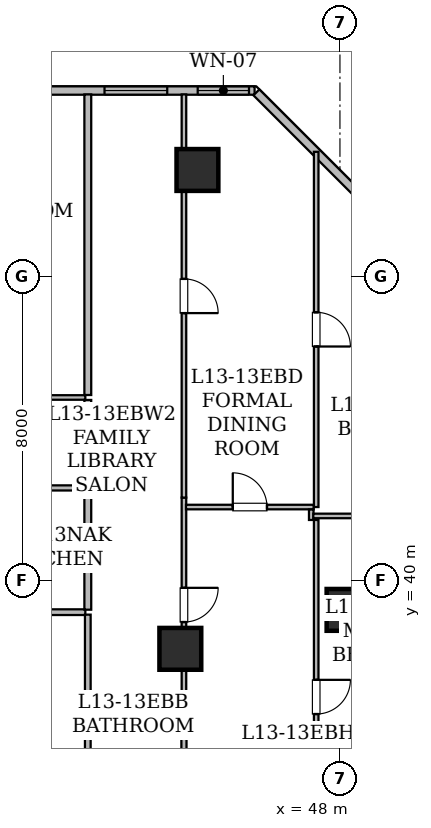
"""IFC4 building model, lengths in metres.
Left out: names, types, materials, properties, quantities, classifications, styles, units other than length and angle.
Written with IfcOpenShell. Run it as: python <this file> out.ifc"""

import sys

from ifc_helpers import new_model, si_unit, direction, frame, frame_2d, origin, origin_2d, place, context, subcontext, project, spatial, rectangle, hollow_rectangle, extrude, element, fill, save


model = new_model("IFC4")
c1 = context("Model", 3, precision=1e-05, world=origin(), true_north=direction((0.0, 1.0)))
c2 = subcontext(c1, "Body", "Model", "MODEL_VIEW")
j1 = project(units=[si_unit("LENGTHUNIT", "METRE"), si_unit("PLANEANGLEUNIT", "RADIAN")], contexts=[c1])
p1 = place(None, origin())
s1 = spatial("IfcSite", under=j1, at=p1, CompositionType="ELEMENT")
p2 = place(p1, origin())
s2 = spatial("IfcBuilding", under=s1, at=p2, CompositionType="ELEMENT")
p3 = place(p2, frame((0.0, 0.0, 55.2)))
s3 = spatial("IfcBuildingStorey", under=s2, at=p3, CompositionType="ELEMENT", Elevation=55.2)
for number, where, z_axis, x_axis in (
    (1, (44.25, 50.8, 0.0), (0.0, 0.0, 1.0), (1.0, 0.0, 0.0)),
    (2, (48.2, 39.225, 0.0), (0.0, 0.0, 1.0), (1.0, 0.0, 0.0)),
    (3, (43.8, 38.2, 0.0), (0.0, 0.0, 1.0), (1.0, 0.0, 0.0)),
):
    element("IfcColumn", number, at=place(p3, frame(where, z_axis=z_axis, x_axis=x_axis)), inside=s3, PredefinedType="COLUMN", context=c2, shape_type="SweptSolid", body=[
        extrude(hollow_rectangle(XDim=1.1, YDim=1.1, WallThickness=0.055, at=origin_2d()), origin(), (0.0, 0.0, 1.0), 3.65),
    ])
p4 = place(p3, frame((8.315, 52.89, 0.0), z_axis=(0.0, 0.0, 1.0), x_axis=(1.0, 0.0, 0.0)))
e4 = element("IfcWall", 4, at=p4, inside=s3, PredefinedType="STANDARD", context=c2, shape_type="SweptSolid", body=[
    extrude(rectangle(XDim=37.439, YDim=0.22, at=frame_2d((18.719, 0.0))), origin(), (0.0, 0.0, 1.0), 3.43),
])
p5 = place(p4, frame((5.093, 0.0, 0.85)))
e5 = element("IfcOpeningElement", 5, at=p5, cuts=e4, PredefinedType="OPENING", context=c2, shape_type="SweptSolid", body=[
    extrude(rectangle(XDim=1.65, YDim=1.55, at=frame_2d((0.825, 0.775))), frame((0.0, 0.12, 0.0), z_axis=(0.0, -1.0, 0.0), x_axis=(1.0, 0.0, 0.0)), (0.0, 0.0, 1.0), 0.24),
])
p6 = place(p4, frame((13.055, 0.0, 0.8)))
e6 = element("IfcOpeningElement", 6, at=p6, cuts=e4, PredefinedType="OPENING", context=c2, shape_type="SweptSolid", body=[
    extrude(rectangle(XDim=1.2, YDim=1.5, at=frame_2d((0.6, 0.75))), frame((0.0, 0.12, 0.0), z_axis=(0.0, -1.0, 0.0), x_axis=(1.0, 0.0, 0.0)), (0.0, 0.0, 1.0), 0.24),
])
p7 = place(p4, frame((10.005, 0.0, 0.85)))
e7 = element("IfcOpeningElement", 7, at=p7, cuts=e4, PredefinedType="OPENING", context=c2, shape_type="SweptSolid", body=[
    extrude(rectangle(XDim=1.65, YDim=1.55, at=frame_2d((0.825, 0.775))), frame((0.0, 0.12, 0.0), z_axis=(0.0, -1.0, 0.0), x_axis=(1.0, 0.0, 0.0)), (0.0, 0.0, 1.0), 0.24),
])
p8 = place(p4, frame((15.655, 0.0, 0.85)))
e8 = element("IfcOpeningElement", 8, at=p8, cuts=e4, PredefinedType="OPENING", context=c2, shape_type="SweptSolid", body=[
    extrude(rectangle(XDim=1.65, YDim=1.55, at=frame_2d((0.825, 0.775))), frame((0.0, 0.12, 0.0), z_axis=(0.0, -1.0, 0.0), x_axis=(1.0, 0.0, 0.0)), (0.0, 0.0, 1.0), 0.24),
])
p9 = place(p4, frame((25.185, 0.0, 0.8)))
e9 = element("IfcOpeningElement", 9, at=p9, cuts=e4, PredefinedType="OPENING", context=c2, shape_type="SweptSolid", body=[
    extrude(rectangle(XDim=1.2, YDim=1.5, at=frame_2d((0.6, 0.75))), frame((0.0, 0.12, 0.0), z_axis=(0.0, -1.0, 0.0), x_axis=(1.0, 0.0, 0.0)), (0.0, 0.0, 1.0), 0.24),
])
p10 = place(p4, frame((20.935, 0.0, 0.85)))
e10 = element("IfcOpeningElement", 10, at=p10, cuts=e4, PredefinedType="OPENING", context=c2, shape_type="SweptSolid", body=[
    extrude(rectangle(XDim=1.65, YDim=1.55, at=frame_2d((0.825, 0.775))), frame((0.0, 0.12, 0.0), z_axis=(0.0, -1.0, 0.0), x_axis=(1.0, 0.0, 0.0)), (0.0, 0.0, 1.0), 0.24),
])
p11 = place(p4, frame((28.985, 0.0, 0.85)))
e11 = element("IfcOpeningElement", 11, at=p11, cuts=e4, PredefinedType="OPENING", context=c2, shape_type="SweptSolid", body=[
    extrude(rectangle(XDim=1.65, YDim=1.55, at=frame_2d((0.825, 0.775))), frame((0.0, 0.12, 0.0), z_axis=(0.0, -1.0, 0.0), x_axis=(1.0, 0.0, 0.0)), (0.0, 0.0, 1.0), 0.24),
])
p12 = place(p4, frame((33.49, 0.0, 0.85)))
e12 = element("IfcOpeningElement", 12, at=p12, cuts=e4, PredefinedType="OPENING", context=c2, shape_type="SweptSolid", body=[
    extrude(rectangle(XDim=1.65, YDim=1.55, at=frame_2d((0.825, 0.775))), frame((0.0, 0.12, 0.0), z_axis=(0.0, -1.0, 0.0), x_axis=(1.0, 0.0, 0.0)), (0.0, 0.0, 1.0), 0.24),
])
p13 = place(p4, frame((35.942, 0.0, 0.85)))
e13 = element("IfcOpeningElement", 13, at=p13, cuts=e4, PredefinedType="OPENING", context=c2, shape_type="SweptSolid", body=[
    extrude(rectangle(XDim=1.35, YDim=1.5, at=frame_2d((0.675, 0.75))), frame((0.0, 0.12, 0.0), z_axis=(0.0, -1.0, 0.0), x_axis=(1.0, 0.0, 0.0)), (0.0, 0.0, 1.0), 0.24),
])
p14 = place(p3, frame((45.802, 52.842, 0.0), z_axis=(0.0, 0.0, 1.0), x_axis=(0.707085666273, -0.70712789547, 0.0)))
e14 = element("IfcWall", 14, at=p14, inside=s3, PredefinedType="STANDARD", context=c2, shape_type="SweptSolid", body=[
    extrude(rectangle(XDim=5.781, YDim=0.22, at=frame_2d((2.891, 0.0))), origin(), (0.0, 0.0, 1.0), 3.43),
])
p15 = place(p3, frame((34.299, 39.165, 0.0), z_axis=(0.0, 0.0, 1.0), x_axis=(1.0, 0.0, 0.0)))
e15 = element("IfcWall", 15, at=p15, inside=s3, PredefinedType="STANDARD", context=c2, shape_type="SweptSolid", body=[
    extrude(rectangle(XDim=7.001, YDim=0.15, at=frame_2d((3.5, 0.0))), origin(), (0.0, 0.0, 1.0), 3.43),
])
p16 = place(p3, frame((41.365, 39.1, 0.0), z_axis=(0.0, 0.0, 1.0), x_axis=(0.0, -1.0, 0.0)))
e16 = element("IfcWall", 16, at=p16, inside=s3, PredefinedType="STANDARD", context=c2, shape_type="SweptSolid", body=[
    extrude(rectangle(XDim=2.843, YDim=0.15, at=frame_2d((1.421, 0.0))), origin(), (0.0, 0.0, 1.0), 2.647),
])
p17 = place(p3, frame((41.365, 36.257, 0.0), z_axis=(0.0, 0.0, 1.0), x_axis=(0.0, -1.0, 0.0)))
e17 = element("IfcWall", 17, at=p17, inside=s3, PredefinedType="STANDARD", context=c2, shape_type="SweptSolid", body=[
    extrude(rectangle(XDim=4.467, YDim=0.15, at=frame_2d((2.233, 0.0))), origin(), (0.0, 0.0, 1.0), 3.43),
])
p18 = place(p3, frame((41.3, 42.434, 0.0), z_axis=(0.0, 0.0, 1.0), x_axis=(-1.0, 0.0, 0.0)))
e18 = element("IfcWall", 18, at=p18, inside=s3, PredefinedType="PARTITIONING", context=c2, shape_type="SweptSolid", body=[
    extrude(rectangle(XDim=7.315, YDim=0.135, at=frame_2d((3.657, 0.0))), origin(), (0.0, 0.0, 1.0), 2.957),
])
p19 = place(p18, frame((3.233, 0.0, 0.0)))
e19 = element("IfcOpeningElement", 19, at=p19, cuts=e18, PredefinedType="OPENING", context=c2, shape_type="SweptSolid", body=[
    extrude(rectangle(XDim=0.85, YDim=2.1, at=frame_2d((0.425, 1.05))), frame((0.0, 0.077, 0.0), z_axis=(0.0, -1.0, 0.0), x_axis=(1.0, 0.0, 0.0)), (0.0, 0.0, 1.0), 0.155),
])
p20 = place(p3, frame((34.82, 44.814, 0.0), z_axis=(0.0, 0.0, 1.0), x_axis=(1.0, 0.0, 0.0)))
e20 = element("IfcWall", 20, at=p20, inside=s3, PredefinedType="PARTITIONING", context=c2, shape_type="SweptSolid", body=[
    extrude(rectangle(XDim=6.48, YDim=0.12, at=frame_2d((3.24, 0.0))), origin(), (0.0, 0.0, 1.0), 3.43),
])
p21 = place(p3, frame((41.365, 44.749, 0.0), z_axis=(0.0, 0.0, 1.0), x_axis=(0.0, -1.0, 0.0)))
e21 = element("IfcWall", 21, at=p21, inside=s3, PredefinedType="STANDARD", context=c2, shape_type="SweptSolid", body=[
    extrude(rectangle(XDim=2.25, YDim=0.18, at=frame_2d((1.125, 0.0))), origin(), (0.0, 0.0, 1.0), 2.957),
])
p22 = place(p3, frame((41.365, 42.369, 0.0), z_axis=(0.0, 0.0, 1.0), x_axis=(0.0, -1.0, 0.0)))
e22 = element("IfcWall", 22, at=p22, inside=s3, PredefinedType="STANDARD", context=c2, shape_type="SweptSolid", body=[
    extrude(rectangle(XDim=3.139, YDim=0.18, at=frame_2d((1.569, 0.0))), origin(), (0.0, 0.0, 1.0), 3.43),
])
p23 = place(p3, frame((41.365, 52.788, 0.0), z_axis=(0.0, 0.0, 1.0), x_axis=(0.0, -1.0, 0.0)))
e23 = element("IfcWall", 23, at=p23, inside=s3, PredefinedType="STANDARD", context=c2, shape_type="SweptSolid", body=[
    extrude(rectangle(XDim=7.909, YDim=0.18, at=frame_2d((3.955, 0.0))), origin(), (0.0, 0.0, 1.0), 2.803),
])
p24 = place(p3, frame((43.895, 42.18, 0.0), z_axis=(0.0, 0.0, 1.0), x_axis=(0.0, -1.0, 0.0)))
e24 = element("IfcWall", 24, at=p24, inside=s3, PredefinedType="PARTITIONING", context=c2, shape_type="SweptSolid", body=[
    extrude(rectangle(XDim=5.609, YDim=0.12, at=frame_2d((2.804, 0.0))), origin(), (0.0, 0.0, 1.0), 2.647),
])
p25 = place(p24, frame((2.375, 0.0, 0.0)))
e25 = element("IfcOpeningElement", 25, at=p25, cuts=e24, PredefinedType="OPENING", context=c2, shape_type="SweptSolid", body=[
    extrude(rectangle(XDim=0.9, YDim=2.1, at=frame_2d((0.45, 1.05))), frame((0.0, 0.07, 0.0), z_axis=(0.0, -1.0, 0.0), x_axis=(1.0, 0.0, 0.0)), (0.0, 0.0, 1.0), 0.14),
])
p26 = place(p3, frame((43.895, 52.788, 0.0), z_axis=(0.0, 0.0, 1.0), x_axis=(0.0, -1.0, 0.0)))
e26 = element("IfcWall", 26, at=p26, inside=s3, PredefinedType="PARTITIONING", context=c2, shape_type="SweptSolid", body=[
    extrude(rectangle(XDim=10.608, YDim=0.12, at=frame_2d((5.304, 0.0))), origin(), (0.0, 0.0, 1.0), 2.647),
])
p27 = place(p26, frame((4.854, 0.0, 0.0)))
e27 = element("IfcOpeningElement", 27, at=p27, cuts=e26, PredefinedType="OPENING", context=c2, shape_type="SweptSolid", body=[
    extrude(rectangle(XDim=0.9, YDim=2.1, at=frame_2d((0.45, 1.05))), frame((0.0, 0.07, 0.0), z_axis=(0.0, -1.0, 0.0), x_axis=(1.0, 0.0, 0.0)), (0.0, 0.0, 1.0), 0.14),
])
p28 = place(p3, frame((43.83, 36.506, 0.0), z_axis=(0.0, 0.0, 1.0), x_axis=(-1.0, 0.0, 0.0)))
e28 = element("IfcWall", 28, at=p28, inside=s3, PredefinedType="PARTITIONING", context=c2, shape_type="SweptSolid", body=[
    extrude(rectangle(XDim=2.398, YDim=0.135, at=frame_2d((1.199, 0.0))), origin(), (0.0, 0.0, 1.0), 2.647),
])
p29 = place(p3, frame((43.949, 41.931, 0.0), z_axis=(0.0, 0.0, 1.0), x_axis=(1.0, 0.0, 0.0)))
e29 = element("IfcWall", 29, at=p29, inside=s3, PredefinedType="PARTITIONING", context=c2, shape_type="SweptSolid", body=[
    extrude(rectangle(XDim=3.361, YDim=0.12, at=frame_2d((1.681, 0.0))), origin(), (0.0, 0.0, 1.0), 2.647),
])
p30 = place(p29, frame((1.231, 0.0, 0.0)))
e30 = element("IfcOpeningElement", 30, at=p30, cuts=e29, PredefinedType="OPENING", context=c2, shape_type="SweptSolid", body=[
    extrude(rectangle(XDim=0.9, YDim=2.1, at=frame_2d((0.45, 1.05))), frame((0.0, 0.07, 0.0), z_axis=(0.0, -1.0, 0.0), x_axis=(1.0, 0.0, 0.0)), (0.0, 0.0, 1.0), 0.14),
])
p31 = place(p3, frame((47.245, 41.866, 0.0), z_axis=(0.0, 0.0, 1.0), x_axis=(0.0, -1.0, 0.0)))
e31 = element("IfcWall", 31, at=p31, inside=s3, PredefinedType="PARTITIONING", context=c2, shape_type="SweptSolid", body=[
    extrude(rectangle(XDim=0.275, YDim=0.12, at=frame_2d((0.137, 0.0))), origin(), (0.0, 0.0, 1.0), 2.803),
])
p32 = place(p3, frame((43.895, 31.476, 0.0), z_axis=(0.0, 0.0, 1.0), x_axis=(0.0, 1.0, 0.0)))
e32 = element("IfcWall", 32, at=p32, inside=s3, PredefinedType="PARTITIONING", context=c2, shape_type="SweptSolid", body=[
    extrude(rectangle(XDim=5.095, YDim=0.135, at=frame_2d((2.547, 0.0))), origin(), (0.0, 0.0, 1.0), 2.647),
])
p33 = place(p32, frame((2.123, 0.0, 0.0)))
e33 = element("IfcOpeningElement", 33, at=p33, cuts=e32, PredefinedType="OPENING", context=c2, shape_type="SweptSolid", body=[
    extrude(rectangle(XDim=0.85, YDim=2.1, at=frame_2d((0.425, 1.05))), frame((0.0, 0.077, 0.0), z_axis=(0.0, -1.0, 0.0), x_axis=(1.0, 0.0, 0.0)), (0.0, 0.0, 1.0), 0.155),
])
p34 = place(p3, frame((47.375, 41.591, 0.0), z_axis=(0.0, 0.0, 1.0), x_axis=(0.0, -1.0, 0.0)))
e34 = element("IfcWall", 34, at=p34, inside=s3, PredefinedType="PARTITIONING", context=c2, shape_type="SweptSolid", body=[
    extrude(rectangle(XDim=9.315, YDim=0.12, at=frame_2d((4.658, 0.0))), origin(), (0.0, 0.0, 1.0), 2.647),
])
p35 = place(p34, frame((4.207, 0.0, 0.0)))
e35 = element("IfcOpeningElement", 35, at=p35, cuts=e34, PredefinedType="OPENING", context=c2, shape_type="SweptSolid", body=[
    extrude(rectangle(XDim=0.9, YDim=2.1, at=frame_2d((0.45, 1.05))), frame((0.0, 0.07, 0.0), z_axis=(0.0, -1.0, 0.0), x_axis=(1.0, 0.0, 0.0)), (0.0, 0.0, 1.0), 0.14),
])
p36 = place(p3, frame((47.375, 51.278, 0.0), z_axis=(0.0, 0.0, 1.0), x_axis=(0.0, -1.0, 0.0)))
e36 = element("IfcWall", 36, at=p36, inside=s3, PredefinedType="PARTITIONING", context=c2, shape_type="SweptSolid", body=[
    extrude(rectangle(XDim=9.347, YDim=0.12, at=frame_2d((4.674, 0.0))), origin(), (0.0, 0.0, 1.0), 2.803),
])
p37 = place(p36, frame((4.223, 0.0, 0.0)))
e37 = element("IfcOpeningElement", 37, at=p37, cuts=e36, PredefinedType="OPENING", context=c2, shape_type="SweptSolid", body=[
    extrude(rectangle(XDim=0.9, YDim=2.1, at=frame_2d((0.45, 1.05))), frame((0.0, 0.07, 0.0), z_axis=(0.0, -1.0, 0.0), x_axis=(1.0, 0.0, 0.0)), (0.0, 0.0, 1.0), 0.14),
])
p38 = place(p3, frame((47.299, 41.697, 0.0), z_axis=(0.0, 0.0, 1.0), x_axis=(1.0, 0.0, 0.0)))
e38 = element("IfcWall", 38, at=p38, inside=s3, PredefinedType="PARTITIONING", context=c2, shape_type="SweptSolid", body=[
    extrude(rectangle(XDim=2.489, YDim=0.12, at=frame_2d((1.245, 0.0))), origin(), (0.0, 0.0, 1.0), 2.803),
])
p39 = place(p12, origin())
e39 = element("IfcWindow", 39, at=p39, inside=s3, PartitioningType="SINGLE_PANEL", PredefinedType="WINDOW", context=c2, shape_type="SweptSolid", body=[
    extrude(rectangle(XDim=1.65, YDim=1.55, at=frame_2d((0.825, 0.775))), frame((0.0, 0.03, 0.0), z_axis=(0.0, -1.0, 0.0), x_axis=(1.0, 0.0, 0.0)), (0.0, 0.0, 1.0), 0.06),
])
fill(e12, e39)
p40 = place(p13, origin())
e40 = element("IfcWindow", 40, at=p40, inside=s3, PartitioningType="SINGLE_PANEL", PredefinedType="WINDOW", context=c2, shape_type="SweptSolid", body=[
    extrude(rectangle(XDim=1.35, YDim=1.5, at=frame_2d((0.675, 0.75))), frame((0.0, 0.03, 0.0), z_axis=(0.0, -1.0, 0.0), x_axis=(1.0, 0.0, 0.0)), (0.0, 0.0, 1.0), 0.06),
])
fill(e13, e40)
p41 = place(p25, origin())
e41 = element("IfcDoor", 41, at=p41, inside=s3, OperationType="SINGLE_SWING_LEFT", PredefinedType="DOOR", context=c2, shape_type="SweptSolid", body=[
    extrude(rectangle(XDim=0.9, YDim=2.1, at=frame_2d((0.45, 1.05))), frame((0.0, 0.025, 0.0), z_axis=(0.0, -1.0, 0.0), x_axis=(1.0, 0.0, 0.0)), (0.0, 0.0, 1.0), 0.05),
])
fill(e25, e41)
p42 = place(p27, origin())
e42 = element("IfcDoor", 42, at=p42, inside=s3, OperationType="SINGLE_SWING_RIGHT", PredefinedType="DOOR", context=c2, shape_type="SweptSolid", body=[
    extrude(rectangle(XDim=0.9, YDim=2.1, at=frame_2d((0.45, 1.05))), frame((0.0, 0.025, 0.0), z_axis=(0.0, -1.0, 0.0), x_axis=(1.0, 0.0, 0.0)), (0.0, 0.0, 1.0), 0.05),
])
fill(e27, e42)
p43 = place(p30, origin())
e43 = element("IfcDoor", 43, at=p43, inside=s3, OperationType="SINGLE_SWING_LEFT", PredefinedType="DOOR", context=c2, shape_type="SweptSolid", body=[
    extrude(rectangle(XDim=0.9, YDim=2.1, at=frame_2d((0.45, 1.05))), frame((0.0, 0.025, 0.0), z_axis=(0.0, -1.0, 0.0), x_axis=(1.0, 0.0, 0.0)), (0.0, 0.0, 1.0), 0.05),
])
fill(e30, e43)
p44 = place(p35, origin())
e44 = element("IfcDoor", 44, at=p44, inside=s3, OperationType="SINGLE_SWING_LEFT", PredefinedType="DOOR", context=c2, shape_type="SweptSolid", body=[
    extrude(rectangle(XDim=0.9, YDim=2.1, at=frame_2d((0.45, 1.05))), frame((0.0, 0.025, 0.0), z_axis=(0.0, -1.0, 0.0), x_axis=(1.0, 0.0, 0.0)), (0.0, 0.0, 1.0), 0.05),
])
fill(e35, e44)
p45 = place(p37, origin())
e45 = element("IfcDoor", 45, at=p45, inside=s3, OperationType="SINGLE_SWING_RIGHT", PredefinedType="DOOR", context=c2, shape_type="SweptSolid", body=[
    extrude(rectangle(XDim=0.9, YDim=2.1, at=frame_2d((0.45, 1.05))), frame((0.0, 0.025, 0.0), z_axis=(0.0, -1.0, 0.0), x_axis=(1.0, 0.0, 0.0)), (0.0, 0.0, 1.0), 0.05),
])
fill(e37, e45)
save(model, sys.argv[1])
